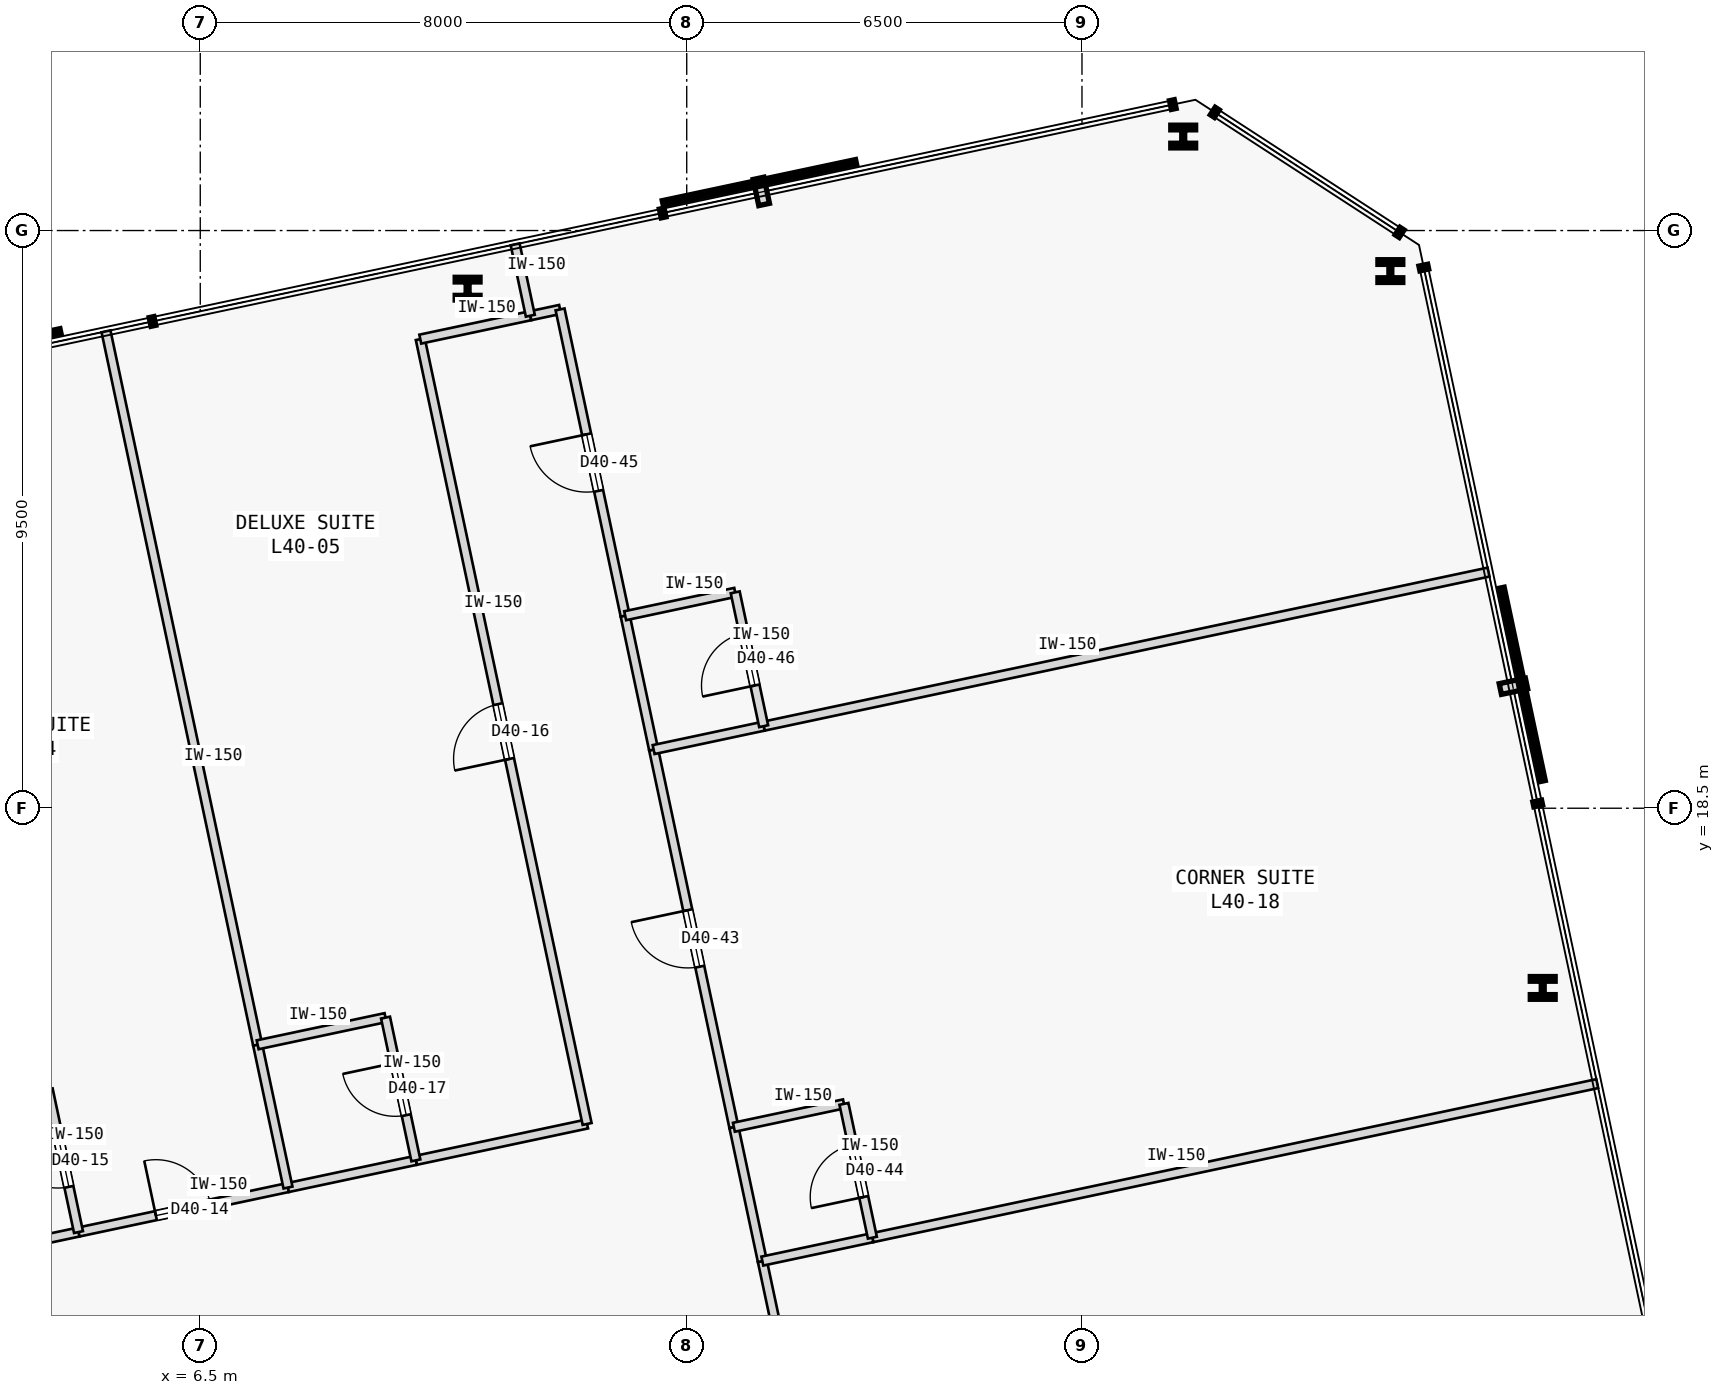
"""IFC4 building model, lengths in metres.
Left out: names, types, materials, properties, quantities, classifications, styles, units other than length and angle.
Written with IfcOpenShell. Run it as: python <this file> out.ifc"""

import sys

from ifc_helpers import new_model, si_unit, direction, frame, frame_2d, origin, origin_2d, place, context, subcontext, project, spatial, rectangle, i_section, extrude, element, fill, save


model = new_model("IFC4")
c1 = context("Model", 3, precision=1e-05, world=origin(), true_north=direction((0.0, 1.0)))
c2 = subcontext(c1, "Body", "Model", "MODEL_VIEW")
j1 = project(units=[si_unit("LENGTHUNIT", "METRE"), si_unit("PLANEANGLEUNIT", "RADIAN")], contexts=[c1])
p1 = place(None, origin())
s1 = spatial("IfcSite", under=j1, at=p1, CompositionType="ELEMENT")
p2 = place(p1, origin())
s2 = spatial("IfcBuilding", under=s1, at=p2, CompositionType="ELEMENT")
p3 = place(p2, frame((0.0, 0.0, 158.2)))
s3 = spatial("IfcBuildingStorey", under=s2, at=p3, CompositionType="ELEMENT", Elevation=158.2)
for number, where, z_axis, x_axis in (
    (1, (28.577, 15.545, 0.0), (0.0, 0.0, 1.0), (1.0, 0.0, 0.0)),
    (2, (26.071, 27.333, 0.0), (0.0, 0.0, 1.0), (1.0, 0.0, 0.0)),
    (3, (22.665, 29.546, 0.0), (0.0, 0.0, 1.0), (1.0, 0.0, 0.0)),
    (4, (10.896, 27.044, 0.0), (0.0, 0.0, 1.0), (1.0, 0.0, 0.0)),
):
    element("IfcColumn", number, at=place(p3, frame(where, z_axis=z_axis, x_axis=x_axis)), inside=s3, PredefinedType="COLUMN", context=c2, shape_type="SweptSolid", body=[
        extrude(i_section(OverallWidth=0.409, OverallDepth=0.374, WebThickness=0.048, FlangeThickness=0.077, FilletRadius=0.015, at=origin_2d()), origin(), (0.0, 0.0, 1.0), 3.4),
    ])
p4 = place(p3, frame((4.498, 11.53, 0.0), z_axis=(0.0, 0.0, 1.0), x_axis=(0.978135941404, 0.207966536089, 0.0)))
e5 = element("IfcWall", 5, at=p4, inside=s3, PredefinedType="PARTITIONING", context=c2, shape_type="SweptSolid", body=[
    extrude(rectangle(XDim=3.522, YDim=0.15, at=frame_2d((1.761, 0.0))), origin(), (0.0, 0.0, 1.0), 3.175),
])
p5 = place(p4, frame((1.301, 0.0, 0.0)))
e6 = element("IfcOpeningElement", 6, at=p5, cuts=e5, PredefinedType="OPENING", context=c2, shape_type="SweptSolid", body=[
    extrude(rectangle(XDim=0.92, YDim=2.15, at=frame_2d((0.46, 1.075))), frame((0.0, 0.085, 0.0), z_axis=(0.0, -1.0, 0.0), x_axis=(1.0, 0.0, 0.0)), (0.0, 0.0, 1.0), 0.17),
])
p6 = place(p3, frame((2.56, 11.118, 0.0), z_axis=(0.0, 0.0, 1.0), x_axis=(0.978149140323, 0.20790444749, 0.0)))
e7 = element("IfcWall", 7, at=p6, inside=s3, PredefinedType="PARTITIONING", context=c2, shape_type="SweptSolid", body=[
    extrude(rectangle(XDim=1.981, YDim=0.15, at=frame_2d((0.99, 0.0))), origin(), (0.0, 0.0, 1.0), 3.175),
])
p7 = place(p3, frame((10.046, 12.709, 0.0), z_axis=(0.0, 0.0, 1.0), x_axis=(0.97816208355, 0.207843542851, 0.0)))
e8 = element("IfcWall", 8, at=p7, inside=s3, PredefinedType="PARTITIONING", context=c2, shape_type="SweptSolid", body=[
    extrude(rectangle(XDim=2.879, YDim=0.15, at=frame_2d((1.439, 0.0))), origin(), (0.0, 0.0, 1.0), 3.175),
])
p8 = place(p3, frame((12.862, 13.308, 0.0), z_axis=(0.0, 0.0, 1.0), x_axis=(-0.207911421929, 0.978147657888, 0.0)))
e9 = element("IfcWall", 9, at=p8, inside=s3, PredefinedType="PARTITIONING", context=c2, shape_type="SweptSolid", body=[
    extrude(rectangle(XDim=13.195, YDim=0.15, at=frame_2d((6.598, 0.0))), origin(), (0.0, 0.0, 1.0), 3.175),
])
p9 = place(p8, frame((6.137, 0.0, 0.0)))
e10 = element("IfcOpeningElement", 10, at=p9, cuts=e9, PredefinedType="OPENING", context=c2, shape_type="SweptSolid", body=[
    extrude(rectangle(XDim=0.92, YDim=2.15, at=frame_2d((0.46, 1.075))), frame((0.0, 0.085, 0.0), z_axis=(0.0, -1.0, 0.0), x_axis=(1.0, 0.0, 0.0)), (0.0, 0.0, 1.0), 0.17),
])
p10 = place(p3, frame((10.118, 26.214, 0.0), z_axis=(0.0, 0.0, 1.0), x_axis=(0.978133353907, 0.20797870558, 0.0)))
e11 = element("IfcWall", 11, at=p10, inside=s3, PredefinedType="PARTITIONING", context=c2, shape_type="SweptSolid", body=[
    extrude(rectangle(XDim=1.85, YDim=0.15, at=frame_2d((0.925, 0.0))), origin(), (0.0, 0.0, 1.0), 3.175),
])
p11 = place(p3, frame((7.943, 12.262, 0.0), z_axis=(0.0, 0.0, 1.0), x_axis=(0.978146728319, 0.207915795165, 0.0)))
e12 = element("IfcWall", 12, at=p11, inside=s3, PredefinedType="PARTITIONING", context=c2, shape_type="SweptSolid", body=[
    extrude(rectangle(XDim=2.15, YDim=0.15, at=frame_2d((1.075, 0.0))), origin(), (0.0, 0.0, 1.0), 3.175),
])
p12 = place(p3, frame((17.064, 4.841, 0.0), z_axis=(0.0, 0.0, 1.0), x_axis=(-0.207924511115, 0.978144875608, 0.0)))
e13 = element("IfcWall", 13, at=p12, inside=s3, PredefinedType="PARTITIONING", context=c2, shape_type="SweptSolid", body=[
    extrude(rectangle(XDim=6.35, YDim=0.15, at=frame_2d((3.175, 0.0))), origin(), (0.0, 0.0, 1.0), 3.175),
])
p13 = place(p12, frame((2.7, 0.0, 0.0)))
e14 = element("IfcOpeningElement", 14, at=p13, cuts=e13, PredefinedType="OPENING", context=c2, shape_type="SweptSolid", body=[
    extrude(rectangle(XDim=0.95, YDim=2.15, at=frame_2d((0.475, 1.075))), frame((0.0, 0.085, 0.0), z_axis=(0.0, -1.0, 0.0), x_axis=(1.0, 0.0, 0.0)), (0.0, 0.0, 1.0), 0.17),
])
p14 = place(p3, frame((15.276, 13.253, 0.0), z_axis=(0.0, 0.0, 1.0), x_axis=(-0.207924511115, 0.978144875608, 0.0)))
e15 = element("IfcWall", 15, at=p14, inside=s3, PredefinedType="PARTITIONING", context=c2, shape_type="SweptSolid", body=[
    extrude(rectangle(XDim=6.35, YDim=0.15, at=frame_2d((3.175, 0.0))), origin(), (0.0, 0.0, 1.0), 3.175),
])
p15 = place(p14, frame((2.7, 0.0, 0.0)))
e16 = element("IfcOpeningElement", 16, at=p15, cuts=e15, PredefinedType="OPENING", context=c2, shape_type="SweptSolid", body=[
    extrude(rectangle(XDim=0.95, YDim=2.15, at=frame_2d((0.475, 1.075))), frame((0.0, 0.085, 0.0), z_axis=(0.0, -1.0, 0.0), x_axis=(1.0, 0.0, 0.0)), (0.0, 0.0, 1.0), 0.17),
])
p16 = place(p3, frame((15.744, 11.052, 0.0), z_axis=(0.0, 0.0, 1.0), x_axis=(-0.207891197838, 0.978151956427, 0.0)))
e17 = element("IfcWall", 17, at=p16, inside=s3, PredefinedType="PARTITIONING", context=c2, shape_type="SweptSolid", body=[
    extrude(rectangle(XDim=2.25, YDim=0.15, at=frame_2d((1.125, 0.0))), origin(), (0.0, 0.0, 1.0), 3.175),
])
p17 = place(p3, frame((11.928, 26.599, 0.0), z_axis=(0.0, 0.0, 1.0), x_axis=(0.97822210712, 0.207560856478, 0.0)))
e18 = element("IfcWall", 18, at=p17, inside=s3, PredefinedType="PARTITIONING", context=c2, shape_type="SweptSolid", body=[
    extrude(rectangle(XDim=0.5, YDim=0.15, at=frame_2d((0.25, 0.0))), origin(), (0.0, 0.0, 1.0), 3.175),
])
p18 = place(p3, frame((13.488, 21.666, 0.0), z_axis=(0.0, 0.0, 1.0), x_axis=(-0.207926226209, 0.978144511028, 0.0)))
e19 = element("IfcWall", 19, at=p18, inside=s3, PredefinedType="PARTITIONING", context=c2, shape_type="SweptSolid", body=[
    extrude(rectangle(XDim=5.15, YDim=0.15, at=frame_2d((2.575, 0.0))), origin(), (0.0, 0.0, 1.0), 3.175),
])
p19 = place(p18, frame((2.1, 0.0, 0.0)))
e20 = element("IfcOpeningElement", 20, at=p19, cuts=e19, PredefinedType="OPENING", context=c2, shape_type="SweptSolid", body=[
    extrude(rectangle(XDim=0.95, YDim=2.15, at=frame_2d((0.475, 1.075))), frame((0.0, 0.085, 0.0), z_axis=(0.0, -1.0, 0.0), x_axis=(1.0, 0.0, 0.0)), (0.0, 0.0, 1.0), 0.17),
])
p20 = place(p3, frame((13.956, 19.465, 0.0), z_axis=(0.0, 0.0, 1.0), x_axis=(-0.207891197838, 0.978151956427, 0.0)))
e21 = element("IfcWall", 21, at=p20, inside=s3, PredefinedType="PARTITIONING", context=c2, shape_type="SweptSolid", body=[
    extrude(rectangle(XDim=2.25, YDim=0.15, at=frame_2d((1.125, 0.0))), origin(), (0.0, 0.0, 1.0), 3.175),
])
p21 = place(p3, frame((4.498, 11.53, 0.0), z_axis=(0.0, 0.0, 1.0), x_axis=(-0.207917150959, 0.978146440129, 0.0)))
e22 = element("IfcWall", 22, at=p21, inside=s3, PredefinedType="PARTITIONING", context=c2, shape_type="SweptSolid", body=[
    extrude(rectangle(XDim=2.4, YDim=0.15, at=frame_2d((1.2, 0.0))), origin(), (0.0, 0.0, 1.0), 3.175),
])
p22 = place(p21, frame((0.76, 0.0, 0.0)))
e23 = element("IfcOpeningElement", 23, at=p22, cuts=e22, PredefinedType="OPENING", context=c2, shape_type="SweptSolid", body=[
    extrude(rectangle(XDim=0.88, YDim=2.15, at=frame_2d((0.44, 1.075))), frame((0.0, 0.085, 0.0), z_axis=(0.0, -1.0, 0.0), x_axis=(1.0, 0.0, 0.0)), (0.0, 0.0, 1.0), 0.17),
])
p23 = place(p3, frame((7.444, 14.61, 0.0), z_axis=(0.0, 0.0, 1.0), x_axis=(-0.207910848762, 0.978147779718, 0.0)))
e24 = element("IfcWall", 24, at=p23, inside=s3, PredefinedType="PARTITIONING", context=c2, shape_type="SweptSolid", body=[
    extrude(rectangle(XDim=11.995, YDim=0.15, at=frame_2d((5.998, 0.0))), origin(), (0.0, 0.0, 1.0), 3.175),
])
p24 = place(p3, frame((7.943, 12.262, 0.0), z_axis=(0.0, 0.0, 1.0), x_axis=(-0.207937840262, 0.978142042133, 0.0)))
e25 = element("IfcWall", 25, at=p24, inside=s3, PredefinedType="PARTITIONING", context=c2, shape_type="SweptSolid", body=[
    extrude(rectangle(XDim=2.4, YDim=0.15, at=frame_2d((1.2, 0.0))), origin(), (0.0, 0.0, 1.0), 3.175),
])
p25 = place(p3, frame((7.444, 14.61, 0.0), z_axis=(0.0, 0.0, 1.0), x_axis=(0.978151636287, 0.207892704126, 0.0)))
e26 = element("IfcWall", 26, at=p25, inside=s3, PredefinedType="PARTITIONING", context=c2, shape_type="SweptSolid", body=[
    extrude(rectangle(XDim=2.15, YDim=0.15, at=frame_2d((1.075, 0.0))), origin(), (0.0, 0.0, 1.0), 3.175),
])
p26 = place(p3, frame((10.046, 12.709, 0.0), z_axis=(0.0, 0.0, 1.0), x_axis=(-0.207840504985, 0.978162729042, 0.0)))
e27 = element("IfcWall", 27, at=p26, inside=s3, PredefinedType="PARTITIONING", context=c2, shape_type="SweptSolid", body=[
    extrude(rectangle(XDim=2.4, YDim=0.15, at=frame_2d((1.2, 0.0))), origin(), (0.0, 0.0, 1.0), 3.175),
])
p27 = place(p26, frame((0.76, 0.0, 0.0)))
e28 = element("IfcOpeningElement", 28, at=p27, cuts=e27, PredefinedType="OPENING", context=c2, shape_type="SweptSolid", body=[
    extrude(rectangle(XDim=0.88, YDim=2.15, at=frame_2d((0.44, 1.075))), frame((0.0, 0.085, 0.0), z_axis=(0.0, -1.0, 0.0), x_axis=(1.0, 0.0, 0.0)), (0.0, 0.0, 1.0), 0.17),
])
p28 = place(p3, frame((11.928, 26.599, 0.0), z_axis=(0.0, 0.0, 1.0), x_axis=(-0.20795853359, 0.978137642823, 0.0)))
e29 = element("IfcWall", 29, at=p28, inside=s3, PredefinedType="PARTITIONING", context=c2, shape_type="SweptSolid", body=[
    extrude(rectangle(XDim=1.2, YDim=0.15, at=frame_2d((0.6, 0.0))), origin(), (0.0, 0.0, 1.0), 3.175),
])
p29 = place(p3, frame((17.553, 11.437, 0.0), z_axis=(0.0, 0.0, 1.0), x_axis=(0.97814556055, 0.207921288896, 0.0)))
e30 = element("IfcWall", 30, at=p29, inside=s3, PredefinedType="PARTITIONING", context=c2, shape_type="SweptSolid", body=[
    extrude(rectangle(XDim=12.187, YDim=0.15, at=frame_2d((6.094, 0.0))), origin(), (0.0, 0.0, 1.0), 3.175),
])
for number, where, z_axis, x_axis in (
    (31, (15.744, 11.052, 0.0), (0.0, 0.0, 1.0), (0.978, 0.208, 0.0)),
    (32, (15.276, 13.253, 0.0), (0.0, 0.0, 1.0), (0.978, 0.208, 0.0)),
):
    element("IfcWall", number, at=place(p3, frame(where, z_axis=z_axis, x_axis=x_axis)), inside=s3, PredefinedType="PARTITIONING", context=c2, shape_type="SweptSolid", body=[
        extrude(rectangle(XDim=1.85, YDim=0.15, at=frame_2d((0.925, 0.0))), origin(), (0.0, 0.0, 1.0), 3.175),
    ])
p30 = place(p3, frame((17.553, 11.437, 0.0), z_axis=(0.0, 0.0, 1.0), x_axis=(-0.207891197838, 0.978151956427, 0.0)))
e33 = element("IfcWall", 33, at=p30, inside=s3, PredefinedType="PARTITIONING", context=c2, shape_type="SweptSolid", body=[
    extrude(rectangle(XDim=2.25, YDim=0.15, at=frame_2d((1.125, 0.0))), origin(), (0.0, 0.0, 1.0), 3.175),
])
p31 = place(p30, frame((0.685, 0.0, 0.0)))
e34 = element("IfcOpeningElement", 34, at=p31, cuts=e33, PredefinedType="OPENING", context=c2, shape_type="SweptSolid", body=[
    extrude(rectangle(XDim=0.88, YDim=2.15, at=frame_2d((0.44, 1.075))), frame((0.0, 0.085, 0.0), z_axis=(0.0, -1.0, 0.0), x_axis=(1.0, 0.0, 0.0)), (0.0, 0.0, 1.0), 0.17),
])
p32 = place(p3, frame((15.765, 19.849, 0.0), z_axis=(0.0, 0.0, 1.0), x_axis=(0.978149634612, 0.207902121941, 0.0)))
e35 = element("IfcWall", 35, at=p32, inside=s3, PredefinedType="PARTITIONING", context=c2, shape_type="SweptSolid", body=[
    extrude(rectangle(XDim=12.187, YDim=0.15, at=frame_2d((6.094, 0.0))), origin(), (0.0, 0.0, 1.0), 3.175),
])
for number, where, z_axis, x_axis in (
    (36, (13.956, 19.465, 0.0), (0.0, 0.0, 1.0), (0.978, 0.208, 0.0)),
    (37, (13.488, 21.666, 0.0), (0.0, 0.0, 1.0), (0.978, 0.208, 0.0)),
):
    element("IfcWall", number, at=place(p3, frame(where, z_axis=z_axis, x_axis=x_axis)), inside=s3, PredefinedType="PARTITIONING", context=c2, shape_type="SweptSolid", body=[
        extrude(rectangle(XDim=1.85, YDim=0.15, at=frame_2d((0.925, 0.0))), origin(), (0.0, 0.0, 1.0), 3.175),
    ])
p33 = place(p3, frame((15.765, 19.849, 0.0), z_axis=(0.0, 0.0, 1.0), x_axis=(-0.207891197838, 0.978151956427, 0.0)))
e38 = element("IfcWall", 38, at=p33, inside=s3, PredefinedType="PARTITIONING", context=c2, shape_type="SweptSolid", body=[
    extrude(rectangle(XDim=2.25, YDim=0.15, at=frame_2d((1.125, 0.0))), origin(), (0.0, 0.0, 1.0), 3.175),
])
p34 = place(p33, frame((0.685, 0.0, 0.0)))
e39 = element("IfcOpeningElement", 39, at=p34, cuts=e38, PredefinedType="OPENING", context=c2, shape_type="SweptSolid", body=[
    extrude(rectangle(XDim=0.88, YDim=2.15, at=frame_2d((0.44, 1.075))), frame((0.0, 0.085, 0.0), z_axis=(0.0, -1.0, 0.0), x_axis=(1.0, 0.0, 0.0)), (0.0, 0.0, 1.0), 0.17),
])
p35 = place(p5, origin())
e40 = element("IfcDoor", 40, at=p35, inside=s3, OperationType="SINGLE_SWING_LEFT", PredefinedType="DOOR", context=c2, shape_type="SweptSolid", body=[
    extrude(rectangle(XDim=0.92, YDim=2.15, at=frame_2d((0.46, 1.075))), frame((0.0, 0.025, 0.0), z_axis=(0.0, -1.0, 0.0), x_axis=(1.0, 0.0, 0.0)), (0.0, 0.0, 1.0), 0.05),
])
fill(e6, e40)
p36 = place(p22, origin())
e41 = element("IfcDoor", 41, at=p36, inside=s3, OperationType="SINGLE_SWING_RIGHT", PredefinedType="DOOR", context=c2, shape_type="SweptSolid", body=[
    extrude(rectangle(XDim=0.88, YDim=2.15, at=frame_2d((0.44, 1.075))), frame((0.0, 0.025, 0.0), z_axis=(0.0, -1.0, 0.0), x_axis=(1.0, 0.0, 0.0)), (0.0, 0.0, 1.0), 0.05),
])
fill(e23, e41)
p37 = place(p9, origin())
e42 = element("IfcDoor", 42, at=p37, inside=s3, OperationType="SINGLE_SWING_LEFT", PredefinedType="DOOR", context=c2, shape_type="SweptSolid", body=[
    extrude(rectangle(XDim=0.92, YDim=2.15, at=frame_2d((0.46, 1.075))), frame((0.0, 0.025, 0.0), z_axis=(0.0, -1.0, 0.0), x_axis=(1.0, 0.0, 0.0)), (0.0, 0.0, 1.0), 0.05),
])
fill(e10, e42)
p38 = place(p27, origin())
e43 = element("IfcDoor", 43, at=p38, inside=s3, OperationType="SINGLE_SWING_RIGHT", PredefinedType="DOOR", context=c2, shape_type="SweptSolid", body=[
    extrude(rectangle(XDim=0.88, YDim=2.15, at=frame_2d((0.44, 1.075))), frame((0.0, 0.025, 0.0), z_axis=(0.0, -1.0, 0.0), x_axis=(1.0, 0.0, 0.0)), (0.0, 0.0, 1.0), 0.05),
])
fill(e28, e43)
p39 = place(p15, origin())
e44 = element("IfcDoor", 44, at=p39, inside=s3, OperationType="SINGLE_SWING_RIGHT", PredefinedType="DOOR", context=c2, shape_type="SweptSolid", body=[
    extrude(rectangle(XDim=0.95, YDim=2.15, at=frame_2d((0.475, 1.075))), frame((0.0, 0.025, 0.0), z_axis=(0.0, -1.0, 0.0), x_axis=(1.0, 0.0, 0.0)), (0.0, 0.0, 1.0), 0.05),
])
fill(e16, e44)
p40 = place(p31, origin())
e45 = element("IfcDoor", 45, at=p40, inside=s3, OperationType="SINGLE_SWING_LEFT", PredefinedType="DOOR", context=c2, shape_type="SweptSolid", body=[
    extrude(rectangle(XDim=0.88, YDim=2.15, at=frame_2d((0.44, 1.075))), frame((0.0, 0.025, 0.0), z_axis=(0.0, -1.0, 0.0), x_axis=(1.0, 0.0, 0.0)), (0.0, 0.0, 1.0), 0.05),
])
fill(e34, e45)
p41 = place(p19, origin())
e46 = element("IfcDoor", 46, at=p41, inside=s3, OperationType="SINGLE_SWING_RIGHT", PredefinedType="DOOR", context=c2, shape_type="SweptSolid", body=[
    extrude(rectangle(XDim=0.95, YDim=2.15, at=frame_2d((0.475, 1.075))), frame((0.0, 0.025, 0.0), z_axis=(0.0, -1.0, 0.0), x_axis=(1.0, 0.0, 0.0)), (0.0, 0.0, 1.0), 0.05),
])
fill(e20, e46)
p42 = place(p34, origin())
e47 = element("IfcDoor", 47, at=p42, inside=s3, OperationType="SINGLE_SWING_LEFT", PredefinedType="DOOR", context=c2, shape_type="SweptSolid", body=[
    extrude(rectangle(XDim=0.88, YDim=2.15, at=frame_2d((0.44, 1.075))), frame((0.0, 0.025, 0.0), z_axis=(0.0, -1.0, 0.0), x_axis=(1.0, 0.0, 0.0)), (0.0, 0.0, 1.0), 0.05),
])
fill(e39, e47)
save(model, sys.argv[1])
